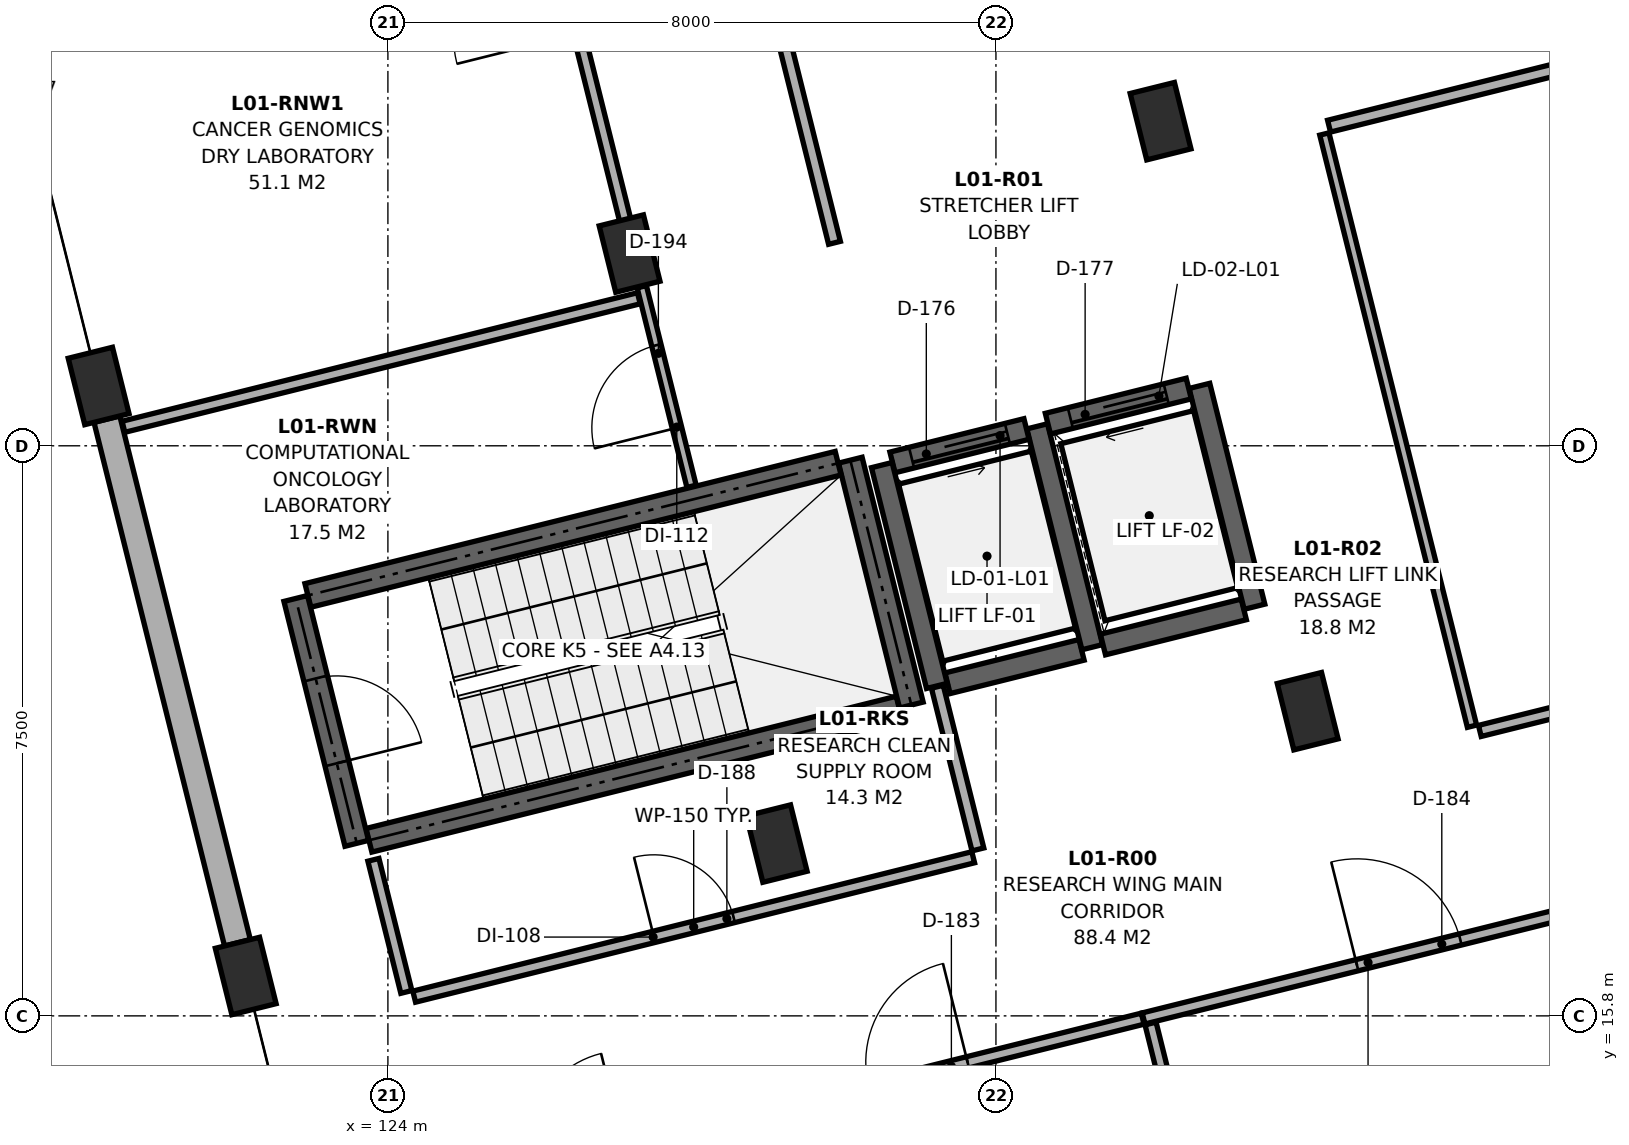
"""IFC4 building model, lengths in metres.
Left out: names, types, materials, properties, quantities, classifications, styles, units other than length and angle.
Written with IfcOpenShell. Run it as: python <this file> out.ifc"""

import sys

from ifc_helpers import new_model, si_unit, direction, frame, frame_2d, origin, origin_2d, place, context, subcontext, project, spatial, rectangle, extrude, element, fill, save


model = new_model("IFC4")
c1 = context("Model", 3, precision=1e-05, world=origin(), true_north=direction((0.0, 1.0)))
c2 = subcontext(c1, "Body", "Model", "MODEL_VIEW")
j1 = project(units=[si_unit("LENGTHUNIT", "METRE"), si_unit("PLANEANGLEUNIT", "RADIAN")], contexts=[c1])
p1 = place(None, origin())
s1 = spatial("IfcSite", under=j1, at=p1, CompositionType="ELEMENT")
p2 = place(p1, origin())
s2 = spatial("IfcBuilding", under=s1, at=p2, CompositionType="ELEMENT")
p3 = place(p2, frame((0.0, 0.0, 5.0)))
s3 = spatial("IfcBuildingStorey", under=s2, at=p3, CompositionType="ELEMENT", Elevation=5.0)
for number, where, z_axis, x_axis in (
    (1, (122.129, 16.325, 0.0), (0.0, 0.0, 1.0), (0.97, 0.242, 0.0)),
    (2, (120.194, 24.087, 0.0), (0.0, 0.0, 1.0), (0.97, 0.242, 0.0)),
    (3, (129.115, 18.067, 0.0), (0.0, 0.0, 1.0), (0.97, 0.242, 0.0)),
    (4, (127.18, 25.829, 0.0), (0.0, 0.0, 1.0), (0.97, 0.242, 0.0)),
    (5, (136.102, 19.808, 0.0), (0.0, 0.0, 1.0), (0.97, 0.242, 0.0)),
    (6, (134.166, 27.571, 0.0), (0.0, 0.0, 1.0), (0.97, 0.242, 0.0)),
):
    element("IfcColumn", number, at=place(p3, frame(where, z_axis=z_axis, x_axis=x_axis)), inside=s3, PredefinedType="COLUMN", context=c2, shape_type="SweptSolid", body=[
        extrude(rectangle(XDim=0.6, YDim=0.9, at=origin_2d()), origin(), (0.0, 0.0, 1.0), 4.2),
    ])
p4 = place(p3, frame((122.02, 16.761, 0.0), z_axis=(0.0, 0.0, 1.0), x_axis=(-0.241912563448, 0.970298052995, 0.0)))
e7 = element("IfcWall", 7, at=p4, inside=s3, PredefinedType="SOLIDWALL", context=c2, shape_type="SweptSolid", body=[
    extrude(rectangle(XDim=7.1, YDim=0.35, at=frame_2d((3.55, 0.0))), origin(), (0.0, 0.0, 1.0), 3.485),
])
p5 = place(p3, frame((123.75, 18.11, 0.0), z_axis=(0.0, 0.0, 1.0), x_axis=(0.970294108333, 0.241928384724, 0.0)))
e8 = element("IfcWall", 8, at=p5, inside=s3, PredefinedType="SHEAR", context=c2, shape_type="SweptSolid", body=[
    extrude(rectangle(XDim=7.19, YDim=0.32, at=frame_2d((3.595, 0.0))), origin(), (0.0, 0.0, 1.0), 4.2),
])
p6 = place(p3, frame((130.887, 19.889, 0.0), z_axis=(0.0, 0.0, 1.0), x_axis=(-0.241947258837, 0.970289402158, 0.0)))
e9 = element("IfcWall", 9, at=p6, inside=s3, PredefinedType="SHEAR", context=c2, shape_type="SweptSolid", body=[
    extrude(rectangle(XDim=3.32, YDim=0.32, at=frame_2d((1.66, 0.0))), origin(), (0.0, 0.0, 1.0), 4.2),
])
p7 = place(p3, frame((129.924, 23.071, 0.0), z_axis=(0.0, 0.0, 1.0), x_axis=(-0.970294108333, -0.241928384724, 0.0)))
e10 = element("IfcWall", 10, at=p7, inside=s3, PredefinedType="SHEAR", context=c2, shape_type="SweptSolid", body=[
    extrude(rectangle(XDim=7.19, YDim=0.32, at=frame_2d((3.595, 0.0))), origin(), (0.0, 0.0, 1.0), 4.2),
])
p8 = place(p3, frame((122.787, 21.292, 0.0), z_axis=(0.0, 0.0, 1.0), x_axis=(0.241860763027, -0.970310966293, 0.0)))
e11 = element("IfcWall", 11, at=p8, inside=s3, PredefinedType="SHEAR", context=c2, shape_type="SweptSolid", body=[
    extrude(rectangle(XDim=3.32, YDim=0.32, at=frame_2d((1.66, 0.0))), origin(), (0.0, 0.0, 1.0), 4.2),
])
p9 = place(p8, frame((1.085, 0.0, 0.0)))
e12 = element("IfcOpeningElement", 12, at=p9, cuts=e11, PredefinedType="OPENING", context=c2, shape_type="SweptSolid", body=[
    extrude(rectangle(XDim=1.15, YDim=2.15, at=frame_2d((0.575, 1.075))), frame((0.0, 0.172, 0.0), z_axis=(0.0, -1.0, 0.0), x_axis=(1.0, 0.0, 0.0)), (0.0, 0.0, 1.0), 0.344),
])
p10 = place(p3, frame((131.363, 20.176, 0.0), z_axis=(0.0, 0.0, 1.0), x_axis=(0.970284587517, 0.241966566341, 0.0)))
e13 = element("IfcWall", 13, at=p10, inside=s3, PredefinedType="SHEAR", context=c2, shape_type="SweptSolid", body=[
    extrude(rectangle(XDim=1.817, YDim=0.28, at=frame_2d((0.909, 0.0))), origin(), (0.0, 0.0, 1.0), 4.2),
])
p11 = place(p3, frame((133.267, 20.651, 0.0), z_axis=(0.0, 0.0, 1.0), x_axis=(-0.241921647353, 0.970295788171, 0.0)))
e14 = element("IfcWall", 14, at=p11, inside=s3, PredefinedType="SHEAR", context=c2, shape_type="SweptSolid", body=[
    extrude(rectangle(XDim=2.994, YDim=0.28, at=frame_2d((1.497, 0.0))), origin(), (0.0, 0.0, 1.0), 4.2),
])
p12 = place(p3, frame((132.402, 23.521, 0.0), z_axis=(0.0, 0.0, 1.0), x_axis=(-0.970284587517, -0.241966566341, 0.0)))
e15 = element("IfcWall", 15, at=p12, inside=s3, PredefinedType="SHEAR", context=c2, shape_type="SweptSolid", body=[
    extrude(rectangle(XDim=1.817, YDim=0.28, at=frame_2d((0.909, 0.0))), origin(), (0.0, 0.0, 1.0), 4.2),
])
p13 = place(p12, frame((0.259, 0.0, 0.0)))
e16 = element("IfcOpeningElement", 16, at=p13, cuts=e15, PredefinedType="OPENING", context=c2, shape_type="SweptSolid", body=[
    extrude(rectangle(XDim=1.3, YDim=2.2, at=frame_2d((0.65, 1.1))), frame((0.0, 0.152, 0.0), z_axis=(0.0, -1.0, 0.0), x_axis=(1.0, 0.0, 0.0)), (0.0, 0.0, 1.0), 0.304),
])
p14 = place(p3, frame((130.498, 23.046, 0.0), z_axis=(0.0, 0.0, 1.0), x_axis=(0.241921647353, -0.970295788171, 0.0)))
e17 = element("IfcWall", 17, at=p14, inside=s3, PredefinedType="SHEAR", context=c2, shape_type="SweptSolid", body=[
    extrude(rectangle(XDim=2.994, YDim=0.28, at=frame_2d((1.497, 0.0))), origin(), (0.0, 0.0, 1.0), 4.2),
])
p15 = place(p3, frame((133.408, 20.686, 0.0), z_axis=(0.0, 0.0, 1.0), x_axis=(0.970285190026, 0.241964150272, 0.0)))
e18 = element("IfcWall", 18, at=p15, inside=s3, PredefinedType="SHEAR", context=c2, shape_type="SweptSolid", body=[
    extrude(rectangle(XDim=1.91, YDim=0.28, at=frame_2d((0.955, 0.0))), origin(), (0.0, 0.0, 1.0), 4.2),
])
p16 = place(p3, frame((135.402, 21.183, 0.0), z_axis=(0.0, 0.0, 1.0), x_axis=(-0.241921647353, 0.970295788171, 0.0)))
e19 = element("IfcWall", 19, at=p16, inside=s3, PredefinedType="SHEAR", context=c2, shape_type="SweptSolid", body=[
    extrude(rectangle(XDim=2.994, YDim=0.28, at=frame_2d((1.497, 0.0))), origin(), (0.0, 0.0, 1.0), 4.2),
])
p17 = place(p3, frame((134.537, 24.053, 0.0), z_axis=(0.0, 0.0, 1.0), x_axis=(-0.970285190026, -0.241964150272, 0.0)))
e20 = element("IfcWall", 20, at=p17, inside=s3, PredefinedType="SHEAR", context=c2, shape_type="SweptSolid", body=[
    extrude(rectangle(XDim=1.91, YDim=0.28, at=frame_2d((0.955, 0.0))), origin(), (0.0, 0.0, 1.0), 4.2),
])
p18 = place(p17, frame((0.305, 0.0, 0.0)))
e21 = element("IfcOpeningElement", 21, at=p18, cuts=e20, PredefinedType="OPENING", context=c2, shape_type="SweptSolid", body=[
    extrude(rectangle(XDim=1.3, YDim=2.2, at=frame_2d((0.65, 1.1))), frame((0.0, 0.152, 0.0), z_axis=(0.0, -1.0, 0.0), x_axis=(1.0, 0.0, 0.0)), (0.0, 0.0, 1.0), 0.304),
])
p19 = place(p3, frame((124.346, 16.053, 0.0), z_axis=(0.0, 0.0, 1.0), x_axis=(0.970295772287, 0.241921711059, 0.0)))
e22 = element("IfcWall", 22, at=p19, inside=s3, PredefinedType="PARTITIONING", context=c2, shape_type="SweptSolid", body=[
    extrude(rectangle(XDim=7.58, YDim=0.15, at=frame_2d((3.79, 0.0))), origin(), (0.0, 0.0, 1.0), 3.385),
])
p20 = place(p19, frame((3.25, 0.0, 0.0)))
e23 = element("IfcOpeningElement", 23, at=p20, cuts=e22, PredefinedType="OPENING", context=c2, shape_type="SweptSolid", body=[
    extrude(rectangle(XDim=1.08, YDim=2.18, at=frame_2d((0.54, 1.09))), frame((0.0, 0.087, 0.0), z_axis=(0.0, -1.0, 0.0), x_axis=(1.0, 0.0, 0.0)), (0.0, 0.0, 1.0), 0.174),
])
p21 = place(p3, frame((127.995, 22.767, 0.0), z_axis=(0.0, 0.0, 1.0), x_axis=(-0.241877500256, 0.9703067942, 0.0)))
e24 = element("IfcWall", 24, at=p21, inside=s3, PredefinedType="PARTITIONING", context=c2, shape_type="SweptSolid", body=[
    extrude(rectangle(XDim=2.706, YDim=0.125, at=frame_2d((1.353, 0.0))), origin(), (0.0, 0.0, 1.0), 4.2),
])
p22 = place(p21, frame((0.793, 0.0, 0.0)))
e25 = element("IfcOpeningElement", 25, at=p22, cuts=e24, PredefinedType="OPENING", context=c2, shape_type="SweptSolid", body=[
    extrude(rectangle(XDim=1.12, YDim=2.2, at=frame_2d((0.56, 1.1))), frame((0.0, 0.074, 0.0), z_axis=(0.0, -1.0, 0.0), x_axis=(1.0, 0.0, 0.0)), (0.0, 0.0, 1.0), 0.149),
])
p23 = place(p3, frame((128.023, 14.29, 0.0), z_axis=(0.0, 0.0, 1.0), x_axis=(0.970293282145, 0.241931698263, 0.0)))
e26 = element("IfcWall", 26, at=p23, inside=s3, PredefinedType="PARTITIONING", context=c2, shape_type="SweptSolid", body=[
    extrude(rectangle(XDim=6.088, YDim=0.15, at=frame_2d((3.044, 0.0))), origin(), (0.0, 0.0, 1.0), 3.385),
])
p24 = place(p23, frame((2.374, 0.0, 0.0)))
e27 = element("IfcOpeningElement", 27, at=p24, cuts=e26, PredefinedType="OPENING", context=c2, shape_type="SweptSolid", body=[
    extrude(rectangle(XDim=1.34, YDim=2.24, at=frame_2d((0.67, 1.12))), frame((0.0, 0.087, 0.0), z_axis=(0.0, -1.0, 0.0), x_axis=(1.0, 0.0, 0.0)), (0.0, 0.0, 1.0), 0.174),
])
p25 = place(p3, frame((133.942, 15.766, 0.0), z_axis=(0.0, 0.0, 1.0), x_axis=(0.970292162734, 0.241936187739, 0.0)))
e28 = element("IfcWall", 28, at=p25, inside=s3, PredefinedType="PARTITIONING", context=c2, shape_type="SweptSolid", body=[
    extrude(rectangle(XDim=7.188, YDim=0.15, at=frame_2d((3.594, 0.0))), origin(), (0.0, 0.0, 1.0), 3.385),
])
p26 = place(p25, frame((2.894, 0.0, 0.0)))
e29 = element("IfcOpeningElement", 29, at=p26, cuts=e28, PredefinedType="OPENING", context=c2, shape_type="SweptSolid", body=[
    extrude(rectangle(XDim=1.4, YDim=2.25, at=frame_2d((0.7, 1.125))), frame((0.0, 0.087, 0.0), z_axis=(0.0, -1.0, 0.0), x_axis=(1.0, 0.0, 0.0)), (0.0, 0.0, 1.0), 0.174),
])
p27 = place(p3, frame((138.367, 19.549, 0.0), z_axis=(0.0, 0.0, 1.0), x_axis=(0.970292357867, 0.241935405151, 0.0)))
e30 = element("IfcWall", 30, at=p27, inside=s3, PredefinedType="PARTITIONING", context=c2, shape_type="SweptSolid", body=[
    extrude(rectangle(XDim=12.06, YDim=0.15, at=frame_2d((6.03, 0.0))), origin(), (0.0, 0.0, 1.0), 3.385),
])
p28 = place(p27, frame((5.88, 0.0, 0.0)))
e31 = element("IfcOpeningElement", 31, at=p28, cuts=e30, PredefinedType="OPENING", context=c2, shape_type="SweptSolid", body=[
    extrude(rectangle(XDim=1.56, YDim=2.3, at=frame_2d((0.78, 1.15))), frame((0.0, 0.087, 0.0), z_axis=(0.0, -1.0, 0.0), x_axis=(1.0, 0.0, 0.0)), (0.0, 0.0, 1.0), 0.174),
])
p29 = place(p3, frame((127.221, 25.87, 0.0), z_axis=(0.0, 0.0, 1.0), x_axis=(-0.241902639837, 0.970300527074, 0.0)))
e32 = element("IfcWall", 32, at=p29, inside=s3, PredefinedType="PARTITIONING", context=c2, shape_type="SweptSolid", body=[
    extrude(rectangle(XDim=7.533, YDim=0.15, at=frame_2d((3.767, 0.0))), origin(), (0.0, 0.0, 1.0), 3.385),
])
p30 = place(p29, frame((2.941, 0.0, 0.0)))
e33 = element("IfcOpeningElement", 33, at=p30, cuts=e32, PredefinedType="OPENING", context=c2, shape_type="SweptSolid", body=[
    extrude(rectangle(XDim=1.65, YDim=2.32, at=frame_2d((0.825, 1.16))), frame((0.0, 0.087, 0.0), z_axis=(0.0, -1.0, 0.0), x_axis=(1.0, 0.0, 0.0)), (0.0, 0.0, 1.0), 0.174),
])
p31 = place(p3, frame((129.876, 25.97, 0.0), z_axis=(0.0, 0.0, 1.0), x_axis=(-0.241938716353, 0.970291532236, 0.0)))
e34 = element("IfcWall", 34, at=p31, inside=s3, PredefinedType="PARTITIONING", context=c2, shape_type="SweptSolid", body=[
    extrude(rectangle(XDim=7.411, YDim=0.16, at=frame_2d((3.706, 0.0))), origin(), (0.0, 0.0, 1.0), 3.485),
])
p32 = place(p31, frame((2.845, 0.0, 0.0)))
e35 = element("IfcOpeningElement", 35, at=p32, cuts=e34, PredefinedType="OPENING", context=c2, shape_type="SweptSolid", body=[
    extrude(rectangle(XDim=1.72, YDim=2.34, at=frame_2d((0.86, 1.17))), frame((0.0, 0.092, 0.0), z_axis=(0.0, -1.0, 0.0), x_axis=(1.0, 0.0, 0.0)), (0.0, 0.0, 1.0), 0.184),
])
p33 = place(p3, frame((124.243, 16.115, 0.0), z_axis=(0.0, 0.0, 1.0), x_axis=(-0.24202255973, 0.970270622343, 0.0)))
e36 = element("IfcWall", 36, at=p33, inside=s3, PredefinedType="PARTITIONING", context=c2, shape_type="SweptSolid", body=[
    extrude(rectangle(XDim=1.792, YDim=0.15, at=frame_2d((0.896, 0.0))), origin(), (0.0, 0.0, 1.0), 3.485),
])
p34 = place(p3, frame((131.763, 17.99, 0.0), z_axis=(0.0, 0.0, 1.0), x_axis=(-0.241962612769, 0.970285573438, 0.0)))
e37 = element("IfcWall", 37, at=p34, inside=s3, PredefinedType="PARTITIONING", context=c2, shape_type="SweptSolid", body=[
    extrude(rectangle(XDim=2.206, YDim=0.16, at=frame_2d((1.103, 0.0))), origin(), (0.0, 0.0, 1.0), 3.485),
])
p35 = place(p3, frame((120.521, 23.55, 0.0), z_axis=(0.0, 0.0, 1.0), x_axis=(0.970294380964, 0.241927291286, 0.0)))
e38 = element("IfcWall", 38, at=p35, inside=s3, PredefinedType="PARTITIONING", context=c2, shape_type="SweptSolid", body=[
    extrude(rectangle(XDim=6.988, YDim=0.15, at=frame_2d((3.494, 0.0))), origin(), (0.0, 0.0, 1.0), 3.485),
])
p36 = place(p3, frame((135.733, 8.887, 0.0), z_axis=(0.0, 0.0, 1.0), x_axis=(-0.241913757308, 0.970297755344, 0.0)))
e39 = element("IfcWall", 39, at=p36, inside=s3, PredefinedType="PARTITIONING", context=c2, shape_type="SweptSolid", body=[
    extrude(rectangle(XDim=7.021, YDim=0.15, at=frame_2d((3.51, 0.0))), origin(), (0.0, 0.0, 1.0), 3.485),
])
p37 = place(p3, frame((136.383, 27.505, 0.0), z_axis=(0.0, 0.0, 1.0), x_axis=(0.970298155851, 0.241912150896, 0.0)))
e40 = element("IfcWall", 40, at=p37, inside=s3, PredefinedType="PARTITIONING", context=c2, shape_type="SweptSolid", body=[
    extrude(rectangle(XDim=12.163, YDim=0.16, at=frame_2d((6.082, 0.0))), origin(), (0.0, 0.0, 1.0), 3.385),
])
p38 = place(p3, frame((138.264, 19.611, 0.0), z_axis=(0.0, 0.0, 1.0), x_axis=(-0.241920353256, 0.970296110824, 0.0)))
e41 = element("IfcWall", 41, at=p38, inside=s3, PredefinedType="PARTITIONING", context=c2, shape_type="SweptSolid", body=[
    extrude(rectangle(XDim=8.03, YDim=0.125, at=frame_2d((4.015, 0.0))), origin(), (0.0, 0.0, 1.0), 3.485),
])
p39 = place(p9, origin())
e42 = element("IfcDoor", 42, at=p39, inside=s3, OperationType="SINGLE_SWING_RIGHT", PredefinedType="DOOR", context=c2, shape_type="SweptSolid", body=[
    extrude(rectangle(XDim=1.15, YDim=2.15, at=frame_2d((0.575, 1.075))), frame((0.0, 0.025, 0.0), z_axis=(0.0, -1.0, 0.0), x_axis=(1.0, 0.0, 0.0)), (0.0, 0.0, 1.0), 0.05),
])
fill(e12, e42)
p40 = place(p13, origin())
e43 = element("IfcDoor", 43, at=p40, inside=s3, OperationType="SLIDING_TO_LEFT", PredefinedType="DOOR", context=c2, shape_type="SweptSolid", body=[
    extrude(rectangle(XDim=1.3, YDim=2.2, at=frame_2d((0.65, 1.1))), frame((0.0, 0.025, 0.0), z_axis=(0.0, -1.0, 0.0), x_axis=(1.0, 0.0, 0.0)), (0.0, 0.0, 1.0), 0.05),
])
fill(e16, e43)
p41 = place(p18, origin())
e44 = element("IfcDoor", 44, at=p41, inside=s3, OperationType="SLIDING_TO_RIGHT", PredefinedType="DOOR", context=c2, shape_type="SweptSolid", body=[
    extrude(rectangle(XDim=1.3, YDim=2.2, at=frame_2d((0.65, 1.1))), frame((0.0, 0.025, 0.0), z_axis=(0.0, -1.0, 0.0), x_axis=(1.0, 0.0, 0.0)), (0.0, 0.0, 1.0), 0.05),
])
fill(e21, e44)
p42 = place(p20, origin())
e45 = element("IfcDoor", 45, at=p42, inside=s3, OperationType="SINGLE_SWING_LEFT", PredefinedType="DOOR", context=c2, shape_type="SweptSolid", body=[
    extrude(rectangle(XDim=1.08, YDim=2.18, at=frame_2d((0.54, 1.09))), frame((0.0, 0.025, 0.0), z_axis=(0.0, -1.0, 0.0), x_axis=(1.0, 0.0, 0.0)), (0.0, 0.0, 1.0), 0.05),
])
fill(e23, e45)
p43 = place(p22, origin())
e46 = element("IfcDoor", 46, at=p43, inside=s3, OperationType="SINGLE_SWING_LEFT", PredefinedType="DOOR", context=c2, shape_type="SweptSolid", body=[
    extrude(rectangle(XDim=1.12, YDim=2.2, at=frame_2d((0.56, 1.1))), frame((0.0, 0.025, 0.0), z_axis=(0.0, -1.0, 0.0), x_axis=(1.0, 0.0, 0.0)), (0.0, 0.0, 1.0), 0.05),
])
fill(e25, e46)
p44 = place(p24, origin())
e47 = element("IfcDoor", 47, at=p44, inside=s3, OperationType="SINGLE_SWING_RIGHT", PredefinedType="DOOR", context=c2, shape_type="SweptSolid", body=[
    extrude(rectangle(XDim=1.34, YDim=2.24, at=frame_2d((0.67, 1.12))), frame((0.0, 0.025, 0.0), z_axis=(0.0, -1.0, 0.0), x_axis=(1.0, 0.0, 0.0)), (0.0, 0.0, 1.0), 0.05),
])
fill(e27, e47)
p45 = place(p26, origin())
e48 = element("IfcDoor", 48, at=p45, inside=s3, OperationType="SINGLE_SWING_LEFT", PredefinedType="DOOR", context=c2, shape_type="SweptSolid", body=[
    extrude(rectangle(XDim=1.4, YDim=2.25, at=frame_2d((0.7, 1.125))), frame((0.0, 0.025, 0.0), z_axis=(0.0, -1.0, 0.0), x_axis=(1.0, 0.0, 0.0)), (0.0, 0.0, 1.0), 0.05),
])
fill(e29, e48)
save(model, sys.argv[1])
